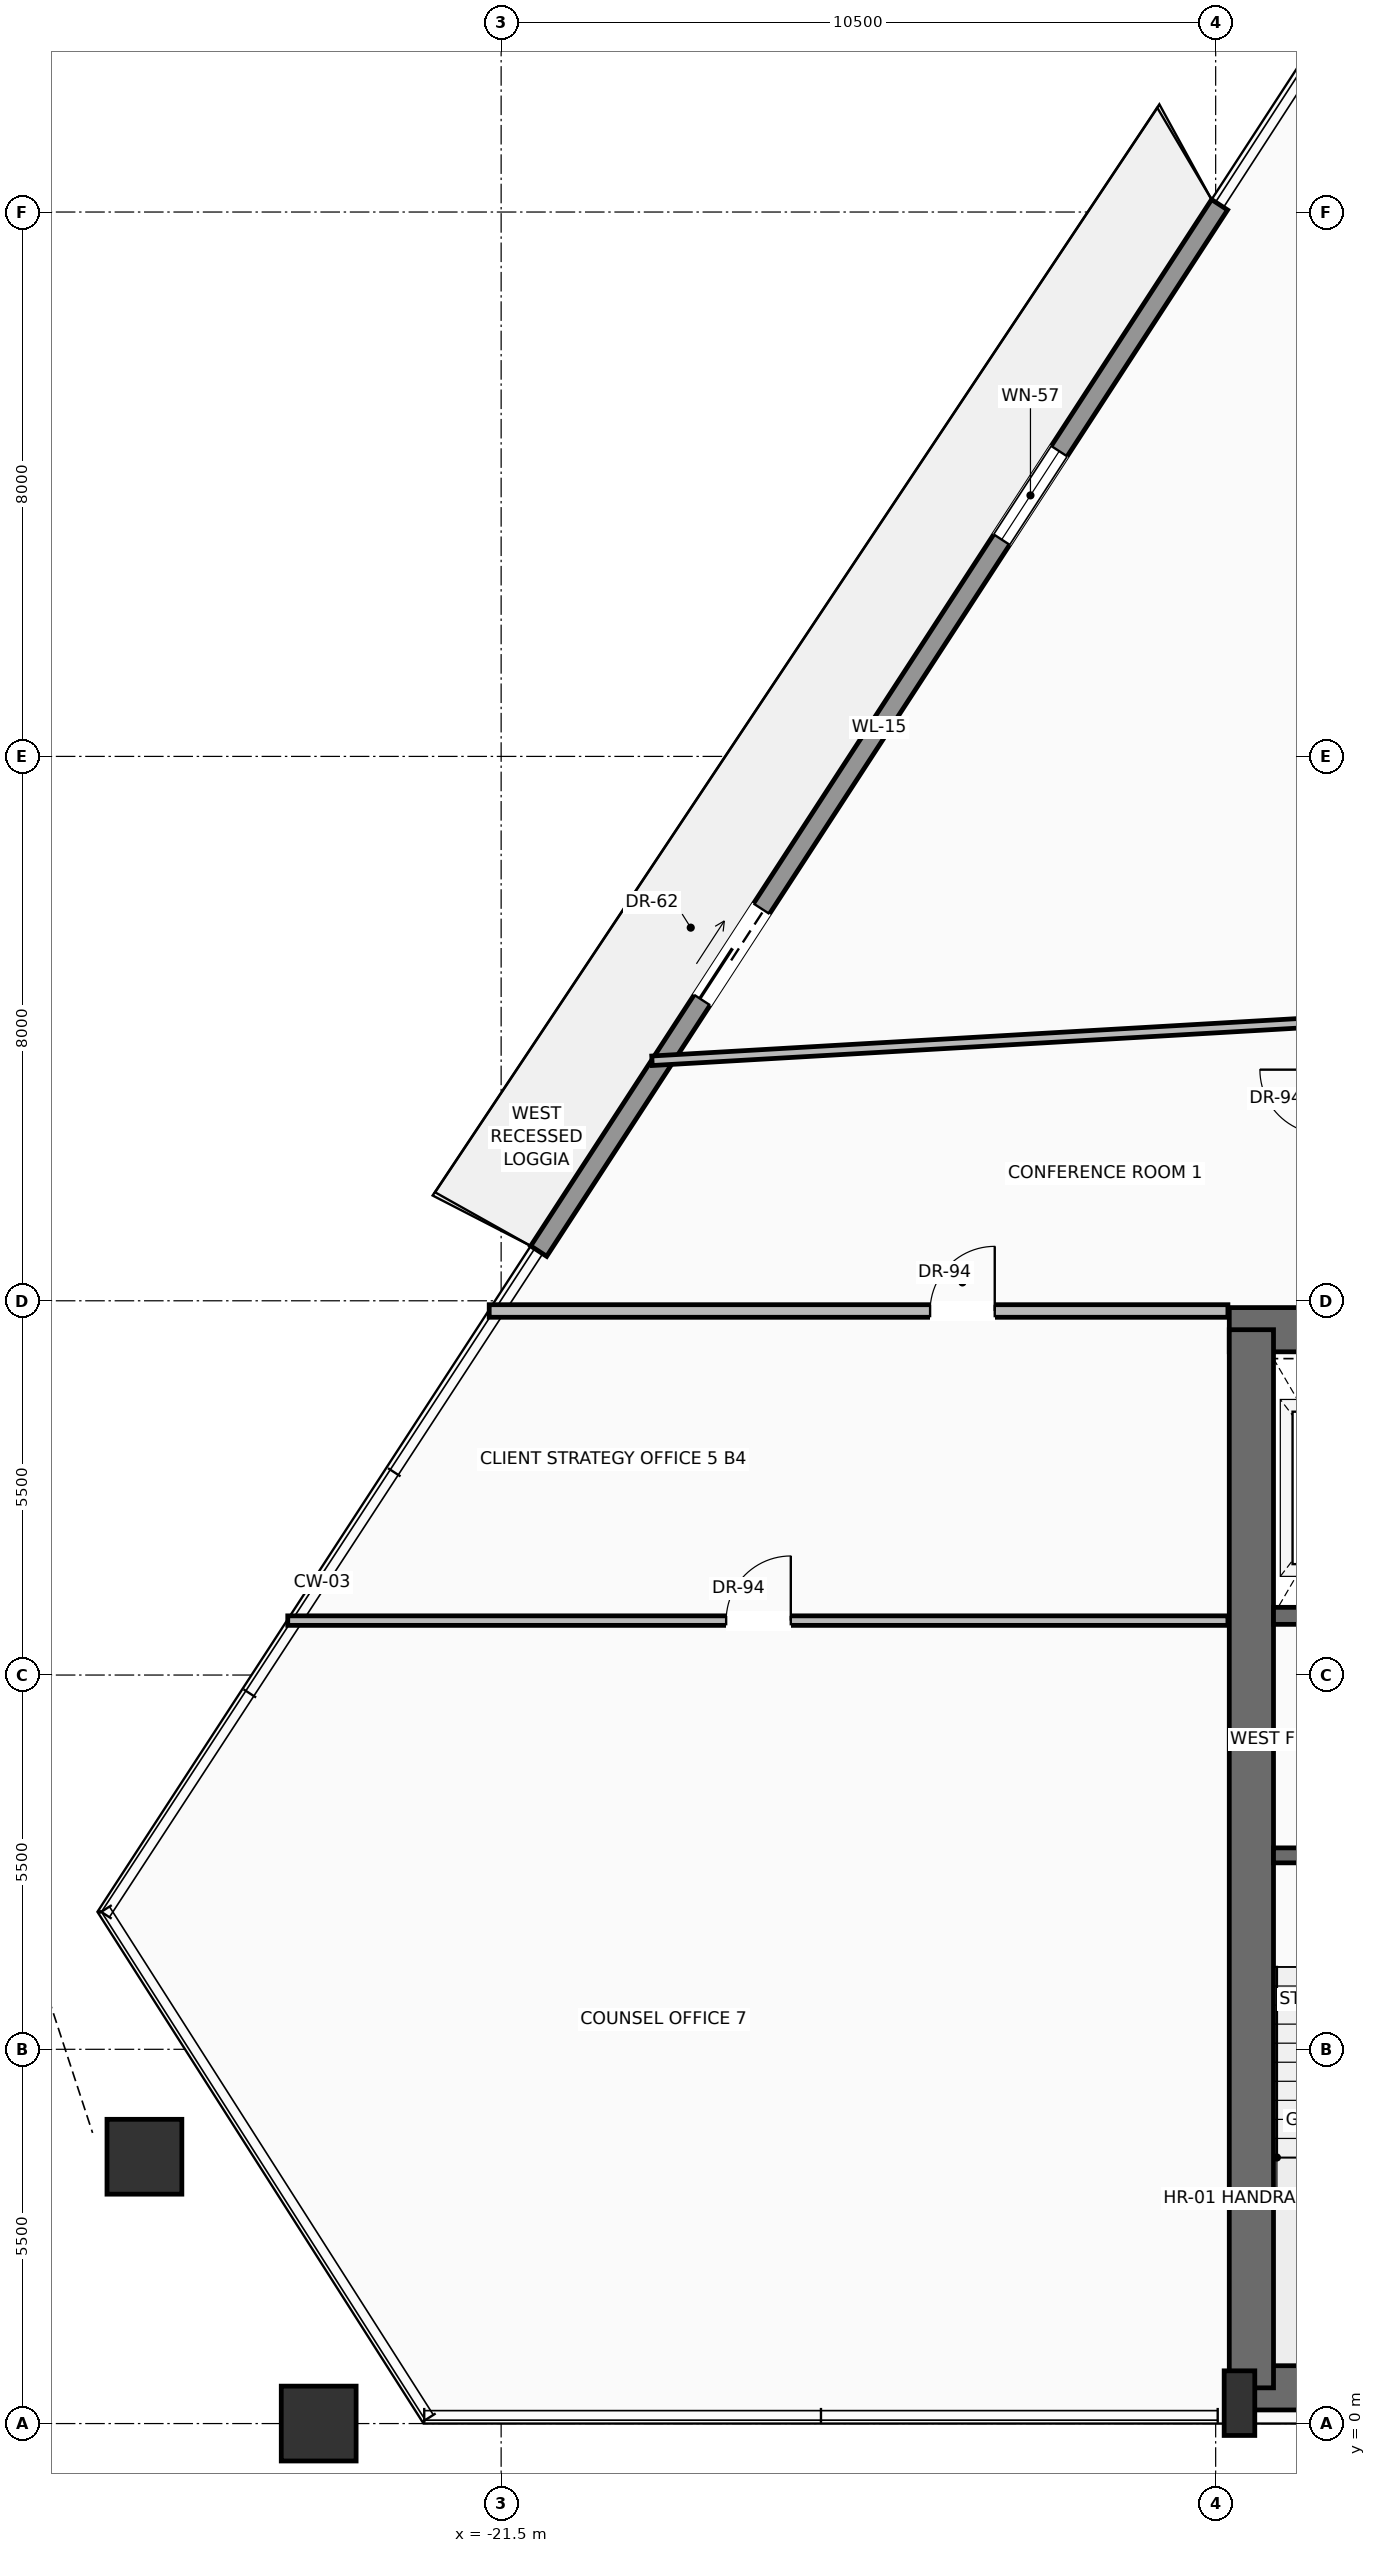
"""IFC4 building model, lengths in metres.
Left out: names, types, materials, properties, quantities, classifications, styles, units other than length and angle.
Written with IfcOpenShell. Run it as: python <this file> out.ifc"""

import sys

from ifc_helpers import new_model, si_unit, direction, frame, frame_2d, origin, origin_2d, place, context, subcontext, project, spatial, rectangle, hollow_rectangle, extrude, source, transform, mapped, element, fill, save


model = new_model("IFC4")
c1 = context("Model", 3, precision=1e-05, world=origin(), true_north=direction((0.0, 1.0)))
c2 = subcontext(c1, "Body", "Model", "MODEL_VIEW")
j1 = project(units=[si_unit("LENGTHUNIT", "METRE"), si_unit("PLANEANGLEUNIT", "RADIAN")], contexts=[c1])
p1 = place(None, origin())
s1 = spatial("IfcSite", under=j1, at=p1, CompositionType="ELEMENT")
p2 = place(p1, origin())
s2 = spatial("IfcBuilding", under=s1, at=p2, CompositionType="ELEMENT")
p3 = place(p2, frame((0.0, 0.0, 140.4)))
s3 = spatial("IfcBuildingStorey", under=s2, at=p3, CompositionType="ELEMENT", Elevation=140.4)
p4 = place(p3, frame((-10.65, 0.525, 0.0), z_axis=(0.0, 0.0, 1.0), x_axis=(1.0, 0.0, 0.0)))
e1 = element("IfcWall", 1, at=p4, inside=s3, PredefinedType="SHEAR", context=c2, shape_type="SweptSolid", body=[
    extrude(rectangle(XDim=21.3, YDim=0.65, at=frame_2d((10.65, 0.0))), origin(), (0.0, 0.0, 1.0), 3.47),
])
p5 = place(p3, frame((-10.8, 16.075, 0.0), z_axis=(0.0, 0.0, 1.0), x_axis=(1.0, 0.0, 0.0)))
e2 = element("IfcWall", 2, at=p5, inside=s3, PredefinedType="SHEAR", context=c2, shape_type="SweptSolid", body=[
    extrude(rectangle(XDim=21.6, YDim=0.65, at=frame_2d((10.8, 0.0))), origin(), (0.0, 0.0, 1.0), 3.47),
])
p6 = place(p5, frame((3.37, 0.0, 0.0)))
e3 = element("IfcOpeningElement", 3, at=p6, cuts=e2, PredefinedType="OPENING", context=c2, shape_type="SweptSolid", body=[
    extrude(rectangle(XDim=1.3, YDim=2.3, at=frame_2d((0.65, 1.15))), frame((0.0, 0.335, 0.0), z_axis=(0.0, -1.0, 0.0), x_axis=(1.0, 0.0, 0.0)), (0.0, 0.0, 1.0), 0.67),
])
p7 = place(p5, frame((9.8, 0.0, 0.0)))
e4 = element("IfcOpeningElement", 4, at=p7, cuts=e2, PredefinedType="OPENING", context=c2, shape_type="SweptSolid", body=[
    extrude(rectangle(XDim=2.0, YDim=2.4, at=frame_2d((1.0, 1.2))), frame((0.0, 0.335, 0.0), z_axis=(0.0, -1.0, 0.0), x_axis=(1.0, 0.0, 0.0)), (0.0, 0.0, 1.0), 0.67),
])
p8 = place(p3, frame((-10.475, 0.525, 0.0), z_axis=(0.0, 0.0, 1.0), x_axis=(0.0, 1.0, 0.0)))
e5 = element("IfcWall", 5, at=p8, inside=s3, PredefinedType="SHEAR", context=c2, shape_type="SweptSolid", body=[
    extrude(rectangle(XDim=15.55, YDim=0.65, at=frame_2d((7.775, 0.0))), origin(), (0.0, 0.0, 1.0), 3.47),
])
m1 = source(origin(), c2, "Body", "SweptSolid", [
    extrude(rectangle(XDim=0.45, YDim=0.95, at=origin_2d()), origin(), (0.0, 0.0, 1.0), 3.7),
])
p9 = place(p3, frame((-10.65, 0.3, 0.0), z_axis=(0.0, 0.0, 1.0), x_axis=(1.0, 0.0, 0.0)))
e6 = element("IfcColumn", 6, at=p9, inside=s3, PredefinedType="PILASTER", context=c2, shape_type="MappedRepresentation", body=[
    mapped(m1, transform((0.0, 0.0, 0.0), scale=1.0)),
])
m2 = source(origin(), c2, "Body", "SweptSolid", [
    extrude(hollow_rectangle(XDim=1.1, YDim=1.1, WallThickness=0.055, at=origin_2d()), origin(), (0.0, 0.0, 1.0), 3.692),
])
p10 = place(p3, frame((-24.181, 0.0, 0.004), z_axis=(-0.010779796898, 0.0, 0.999941896301), x_axis=(0.0, -1.0, 0.0)))
e7 = element("IfcColumn", 7, at=p10, inside=s3, PredefinedType="COLUMN", context=c2, shape_type="MappedRepresentation", body=[
    mapped(m2, transform((0.0, 0.0, 0.0), scale=1.0)),
])
m3 = source(origin(), c2, "Body", "SweptSolid", [
    extrude(hollow_rectangle(XDim=1.1, YDim=1.1, WallThickness=0.055, at=origin_2d()), origin(), (0.0, 0.0, 1.0), 3.692),
])
p11 = place(p3, frame((-26.742, 3.921, 0.004), z_axis=(0.000132257911, -0.016135465126, 0.999869806161), x_axis=(0.999966408573, 0.008196445972, 0.0)))
e8 = element("IfcColumn", 8, at=p11, inside=s3, PredefinedType="COLUMN", context=c2, shape_type="MappedRepresentation", body=[
    mapped(m3, transform((0.0, 0.0, 0.0), scale=1.0)),
])
p12 = place(p3, frame((-20.948, 17.229, 0.0), z_axis=(0.0, 0.0, 1.0), x_axis=(0.545376053717, 0.838191481723, 0.0)))
e9 = element("IfcWall", 9, at=p12, inside=s3, PredefinedType="SOLIDWALL", context=c2, shape_type="SweptSolid", body=[
    extrude(rectangle(XDim=18.346, YDim=0.28, at=frame_2d((9.173, 0.0))), origin(), (0.0, 0.0, 1.0), 3.05),
])
p13 = place(p12, frame((4.403, 0.0, 0.0)))
e10 = element("IfcOpeningElement", 10, at=p13, cuts=e9, PredefinedType="OPENING", context=c2, shape_type="SweptSolid", body=[
    extrude(rectangle(XDim=1.6, YDim=2.35, at=frame_2d((0.8, 1.175))), frame((0.0, 0.15, 0.0), z_axis=(0.0, -1.0, 0.0), x_axis=(1.0, 0.0, 0.0)), (0.0, 0.0, 1.0), 0.3),
])
p14 = place(p12, frame((12.475, 0.0, 0.9)))
e11 = element("IfcOpeningElement", 11, at=p14, cuts=e9, PredefinedType="OPENING", context=c2, shape_type="SweptSolid", body=[
    extrude(rectangle(XDim=1.55, YDim=1.85, at=frame_2d((0.775, 0.925))), frame((0.0, 0.15, 0.0), z_axis=(0.0, -1.0, 0.0), x_axis=(1.0, 0.0, 0.0)), (0.0, 0.0, 1.0), 0.3),
])
p15 = place(p3, frame((-5.5, 8.35, 0.0), z_axis=(0.0, 0.0, 1.0), x_axis=(-1.0, 0.0, 0.0)))
e12 = element("IfcWall", 12, at=p15, inside=s3, PredefinedType="SOLIDWALL", context=c2, shape_type="SweptSolid", body=[
    extrude(rectangle(XDim=4.65, YDim=0.22, at=frame_2d((2.325, 0.0))), origin(), (0.0, 0.0, 1.0), 3.47),
])
p16 = place(p15, frame((2.5, 0.0, 0.0)))
e13 = element("IfcOpeningElement", 13, at=p16, cuts=e12, PredefinedType="OPENING", context=c2, shape_type="SweptSolid", body=[
    extrude(rectangle(XDim=1.15, YDim=2.2, at=frame_2d((0.575, 1.1))), frame((0.0, 0.12, 0.0), z_axis=(0.0, -1.0, 0.0), x_axis=(1.0, 0.0, 0.0)), (0.0, 0.0, 1.0), 0.24),
])
p17 = place(p3, frame((-5.5, 11.87, 0.0), z_axis=(0.0, 0.0, 1.0), x_axis=(-1.0, 0.0, 0.0)))
e14 = element("IfcWall", 14, at=p17, inside=s3, PredefinedType="SOLIDWALL", context=c2, shape_type="SweptSolid", body=[
    extrude(rectangle(XDim=4.65, YDim=0.25, at=frame_2d((2.325, 0.0))), origin(), (0.0, 0.0, 1.0), 3.47),
])
p18 = place(p17, frame((2.95, 0.0, 0.0)))
e15 = element("IfcOpeningElement", 15, at=p18, cuts=e14, PredefinedType="OPENING", context=c2, shape_type="SweptSolid", body=[
    extrude(rectangle(XDim=1.2, YDim=2.25, at=frame_2d((0.6, 1.125))), frame((0.0, 0.135, 0.0), z_axis=(0.0, -1.0, 0.0), x_axis=(1.0, 0.0, 0.0)), (0.0, 0.0, 1.0), 0.27),
])
p19 = place(p3, frame((-21.675, 16.35, 0.0), z_axis=(0.0, 0.0, 1.0), x_axis=(1.0, 0.0, 0.0)))
e16 = element("IfcWall", 16, at=p19, inside=s3, PredefinedType="PARTITIONING", context=c2, shape_type="SweptSolid", body=[
    extrude(rectangle(XDim=10.855, YDim=0.185, at=frame_2d((5.428, 0.0))), origin(), (0.0, 0.0, 1.0), 3.462),
])
p20 = place(p19, frame((6.479, 0.0, 0.0)))
e17 = element("IfcOpeningElement", 17, at=p20, cuts=e16, PredefinedType="OPENING", context=c2, shape_type="SweptSolid", body=[
    extrude(rectangle(XDim=0.95, YDim=2.2, at=frame_2d((0.475, 1.1))), frame((0.0, 0.103, 0.0), z_axis=(0.0, -1.0, 0.0), x_axis=(1.0, 0.0, 0.0)), (0.0, 0.0, 1.0), 0.205),
])
p21 = place(p3, frame((-24.636, 11.8, 0.0), z_axis=(0.0, 0.0, 1.0), x_axis=(1.0, 0.0, 0.0)))
e18 = element("IfcWall", 18, at=p21, inside=s3, PredefinedType="PARTITIONING", context=c2, shape_type="SweptSolid", body=[
    extrude(rectangle(XDim=13.816, YDim=0.14, at=frame_2d((6.908, 0.0))), origin(), (0.0, 0.0, 1.0), 3.462),
])
p22 = place(p21, frame((6.442, 0.0, 0.0)))
e19 = element("IfcOpeningElement", 19, at=p22, cuts=e18, PredefinedType="OPENING", context=c2, shape_type="SweptSolid", body=[
    extrude(rectangle(XDim=0.95, YDim=2.2, at=frame_2d((0.475, 1.1))), frame((0.0, 0.08, 0.0), z_axis=(0.0, -1.0, 0.0), x_axis=(1.0, 0.0, 0.0)), (0.0, 0.0, 1.0), 0.16),
])
p23 = place(p3, frame((-19.283, 20.027, 0.0), z_axis=(0.0, 0.0, 1.0), x_axis=(0.998323429122, 0.057882042691, 0.0)))
e20 = element("IfcWall", 20, at=p23, inside=s3, PredefinedType="PARTITIONING", context=c2, shape_type="SweptSolid", body=[
    extrude(rectangle(XDim=9.899, YDim=0.14, at=frame_2d((4.95, 0.0))), origin(), (0.0, 0.0, 1.0), 3.462),
])
m4 = source(origin(), c2, "Body", "SweptSolid", [
    extrude(rectangle(XDim=1.6, YDim=2.35, at=frame_2d((0.8, 1.175))), frame((0.0, 0.025, 0.0), z_axis=(0.0, -1.0, 0.0), x_axis=(1.0, 0.0, 0.0)), (0.0, 0.0, 1.0), 0.05),
])
p24 = place(p13, origin())
e21 = element("IfcDoor", 21, at=p24, inside=s3, OperationType="SLIDING_TO_LEFT", PredefinedType="DOOR", context=c2, shape_type="MappedRepresentation", body=[
    mapped(m4, transform((0.0, 0.0, 0.0), scale=1.0)),
])
fill(e10, e21)
m5 = source(origin(), c2, "Body", "SweptSolid", [
    extrude(rectangle(XDim=1.55, YDim=1.85, at=frame_2d((0.775, 0.925))), frame((0.0, 0.03, 0.0), z_axis=(0.0, -1.0, 0.0), x_axis=(1.0, 0.0, 0.0)), (0.0, 0.0, 1.0), 0.06),
])
p25 = place(p14, origin())
e22 = element("IfcWindow", 22, at=p25, inside=s3, PartitioningType="SINGLE_PANEL", PredefinedType="WINDOW", context=c2, shape_type="MappedRepresentation", body=[
    mapped(m5, transform((0.0, 0.0, 0.0), scale=1.0)),
])
fill(e11, e22)
m6 = source(origin(), c2, "Body", "SweptSolid", [
    extrude(rectangle(XDim=0.95, YDim=2.2, at=frame_2d((0.475, 1.1))), frame((0.0, 0.025, 0.0), z_axis=(0.0, -1.0, 0.0), x_axis=(1.0, 0.0, 0.0)), (0.0, 0.0, 1.0), 0.05),
])
p26 = place(p20, origin())
e23 = element("IfcDoor", 23, at=p26, inside=s3, OperationType="SINGLE_SWING_RIGHT", PredefinedType="DOOR", context=c2, shape_type="MappedRepresentation", body=[
    mapped(m6, transform((0.0, 0.0, 0.0), scale=1.0)),
])
fill(e17, e23)
p27 = place(p22, origin())
e24 = element("IfcDoor", 24, at=p27, inside=s3, OperationType="SINGLE_SWING_RIGHT", PredefinedType="DOOR", context=c2, shape_type="MappedRepresentation", body=[
    mapped(m6, transform((0.0, 0.0, 0.0), scale=1.0)),
])
fill(e19, e24)
save(model, sys.argv[1])
